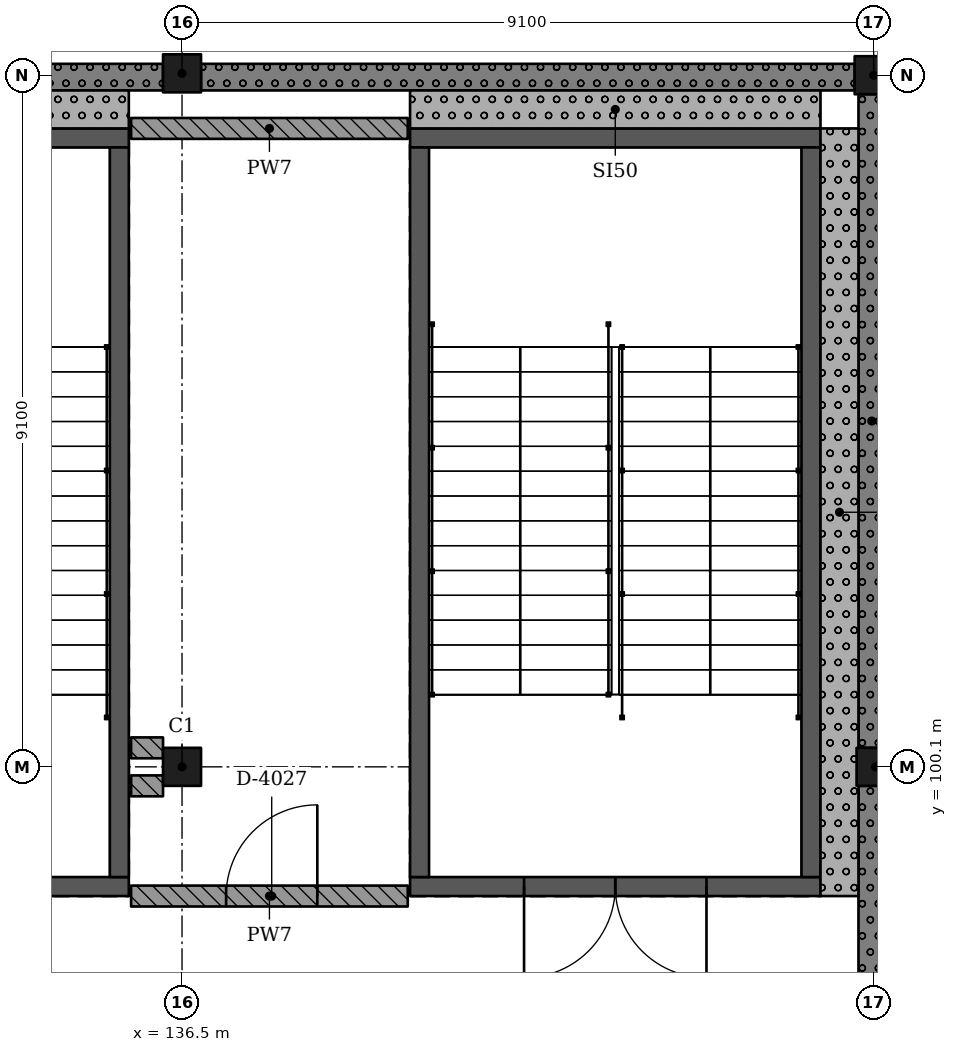
"""IFC4 building model, lengths in metres.
Left out: names, types, materials, properties, quantities, classifications, styles, units other than length and angle.
Written with IfcOpenShell. Run it as: python <this file> out.ifc"""

import sys

from ifc_helpers import new_model, si_unit, direction, frame, frame_2d, origin, origin_2d, place, context, subcontext, project, spatial, rectangle, extrude, element, fill, save


model = new_model("IFC4")
c1 = context("Model", 3, precision=1e-05, world=origin(), true_north=direction((0.0, 1.0)))
c2 = subcontext(c1, "Body", "Model", "MODEL_VIEW")
j1 = project(units=[si_unit("LENGTHUNIT", "METRE"), si_unit("PLANEANGLEUNIT", "RADIAN")], contexts=[c1])
p1 = place(None, origin())
s1 = spatial("IfcSite", under=j1, at=p1, CompositionType="ELEMENT")
p2 = place(p1, origin())
s2 = spatial("IfcBuilding", under=s1, at=p2, CompositionType="ELEMENT")
p3 = place(p2, frame((0.0, 0.0, 20.02)))
s3 = spatial("IfcBuildingStorey", under=s2, at=p3, CompositionType="ELEMENT", Elevation=20.02)
for number, where, z_axis, x_axis in (
    (1, (136.5, 100.1, 0.0), (0.0, 0.0, 1.0), (1.0, 0.0, 0.0)),
    (2, (136.5, 109.225, 0.0), (0.0, 0.0, 1.0), (1.0, 0.0, 0.0)),
    (3, (145.625, 100.1, 0.0), (0.0, 0.0, 1.0), (1.0, 0.0, 0.0)),
    (4, (145.6, 109.2, 0.0), (0.0, 0.0, 1.0), (1.0, 0.0, 0.0)),
):
    element("IfcColumn", number, at=place(p3, frame(where, z_axis=z_axis, x_axis=x_axis)), inside=s3, PredefinedType="COLUMN", context=c2, shape_type="SweptSolid", body=[
        extrude(rectangle(XDim=0.5, YDim=0.5, at=origin_2d()), origin(), (0.0, 0.0, 1.0), 4.55),
    ])
p4 = place(p3, frame((144.9, 98.525, 0.0), z_axis=(0.0, 0.0, 1.0), x_axis=(-1.0, 0.0, 0.0)))
e5 = element("IfcWall", 5, at=p4, inside=s3, PredefinedType="SHEAR", context=c2, shape_type="SweptSolid", body=[
    extrude(rectangle(XDim=5.4, YDim=0.25, at=frame_2d((2.7, 0.0))), origin(), (0.0, 0.0, 1.0), 4.55),
])
p5 = place(p4, frame((1.5, 0.0, 0.0)))
e6 = element("IfcOpeningElement", 6, at=p5, cuts=e5, PredefinedType="OPENING", context=c2, shape_type="SweptSolid", body=[
    extrude(rectangle(XDim=2.4, YDim=2.1, at=frame_2d((1.2, 1.05))), frame((0.0, 0.135, 0.0), z_axis=(0.0, -1.0, 0.0), x_axis=(1.0, 0.0, 0.0)), (0.0, 0.0, 1.0), 0.27),
])
p6 = place(p3, frame((144.9, 108.375, 0.0), z_axis=(0.0, 0.0, 1.0), x_axis=(-1.0, 0.0, 0.0)))
e7 = element("IfcWall", 7, at=p6, inside=s3, PredefinedType="SHEAR", context=c2, shape_type="SweptSolid", body=[
    extrude(rectangle(XDim=5.4, YDim=0.25, at=frame_2d((2.7, 0.0))), origin(), (0.0, 0.0, 1.0), 4.55),
])
for number, where, z_axis, x_axis in (
    (8, (139.625, 108.25, 0.0), (0.0, 0.0, 1.0), (0.0, -1.0, 0.0)),
    (9, (144.775, 108.25, 0.0), (0.0, 0.0, 1.0), (0.0, -1.0, 0.0)),
):
    element("IfcWall", number, at=place(p3, frame(where, z_axis=z_axis, x_axis=x_axis)), inside=s3, PredefinedType="SHEAR", context=c2, shape_type="SweptSolid", body=[
        extrude(rectangle(XDim=9.6, YDim=0.25, at=frame_2d((4.8, 0.0))), origin(), (0.0, 0.0, 1.0), 4.55),
    ])
p7 = place(p3, frame((135.8, 98.525, 0.0), z_axis=(0.0, 0.0, 1.0), x_axis=(-1.0, 0.0, 0.0)))
e10 = element("IfcWall", 10, at=p7, inside=s3, PredefinedType="SHEAR", context=c2, shape_type="SweptSolid", body=[
    extrude(rectangle(XDim=5.4, YDim=0.25, at=frame_2d((2.7, 0.0))), origin(), (0.0, 0.0, 1.0), 4.55),
])
p8 = place(p7, frame((1.5, 0.0, 0.0)))
e11 = element("IfcOpeningElement", 11, at=p8, cuts=e10, PredefinedType="OPENING", context=c2, shape_type="SweptSolid", body=[
    extrude(rectangle(XDim=2.4, YDim=2.1, at=frame_2d((1.2, 1.05))), frame((0.0, 0.135, 0.0), z_axis=(0.0, -1.0, 0.0), x_axis=(1.0, 0.0, 0.0)), (0.0, 0.0, 1.0), 0.27),
])
p9 = place(p3, frame((135.8, 108.375, 0.0), z_axis=(0.0, 0.0, 1.0), x_axis=(-1.0, 0.0, 0.0)))
e12 = element("IfcWall", 12, at=p9, inside=s3, PredefinedType="SHEAR", context=c2, shape_type="SweptSolid", body=[
    extrude(rectangle(XDim=5.4, YDim=0.25, at=frame_2d((2.7, 0.0))), origin(), (0.0, 0.0, 1.0), 4.55),
])
p10 = place(p3, frame((135.675, 108.25, 0.0), z_axis=(0.0, 0.0, 1.0), x_axis=(0.0, -1.0, 0.0)))
e13 = element("IfcWall", 13, at=p10, inside=s3, PredefinedType="SHEAR", context=c2, shape_type="SweptSolid", body=[
    extrude(rectangle(XDim=9.6, YDim=0.25, at=frame_2d((4.8, 0.0))), origin(), (0.0, 0.0, 1.0), 4.55),
])
p11 = place(p3, frame((145.575, 91.25, 0.0), z_axis=(0.0, 0.0, 1.0), x_axis=(0.0, 1.0, 0.0)))
e14 = element("IfcWall", 14, at=p11, inside=s3, PredefinedType="SOLIDWALL", context=c2, shape_type="SweptSolid", body=[
    extrude(rectangle(XDim=8.6, YDim=0.35, at=frame_2d((4.3, 0.0))), origin(), (0.0, 0.0, 1.0), 3.5),
])
p12 = place(p3, frame((145.575, 100.35, 0.0), z_axis=(0.0, 0.0, 1.0), x_axis=(0.0, 1.0, 0.0)))
e15 = element("IfcWall", 15, at=p12, inside=s3, PredefinedType="SOLIDWALL", context=c2, shape_type="SweptSolid", body=[
    extrude(rectangle(XDim=8.6, YDim=0.35, at=frame_2d((4.3, 0.0))), origin(), (0.0, 0.0, 1.0), 3.5),
])
for number, where, z_axis, x_axis in (
    (16, (145.35, 109.175, 0.0), (0.0, 0.0, 1.0), (-1.0, 0.0, 0.0)),
    (17, (136.25, 109.175, 0.0), (0.0, 0.0, 1.0), (-1.0, 0.0, 0.0)),
):
    element("IfcWall", number, at=place(p3, frame(where, z_axis=z_axis, x_axis=x_axis)), inside=s3, PredefinedType="SOLIDWALL", context=c2, shape_type="SweptSolid", body=[
        extrude(rectangle(XDim=8.6, YDim=0.35, at=frame_2d((4.3, 0.0))), origin(), (0.0, 0.0, 1.0), 3.5),
    ])
p13 = place(p3, frame((139.5, 108.75, 0.0), z_axis=(0.0, 0.0, 1.0), x_axis=(1.0, 0.0, 0.0)))
e18 = element("IfcWall", 18, at=p13, inside=s3, PredefinedType="SOLIDWALL", context=c2, shape_type="SweptSolid", body=[
    extrude(rectangle(XDim=5.4, YDim=0.5, at=frame_2d((2.7, 0.0))), origin(), (0.0, 0.0, 1.0), 4.25),
])
p14 = place(p3, frame((145.15, 98.4, 0.0), z_axis=(0.0, 0.0, 1.0), x_axis=(0.0, 1.0, 0.0)))
e19 = element("IfcWall", 19, at=p14, inside=s3, PredefinedType="SOLIDWALL", context=c2, shape_type="SweptSolid", body=[
    extrude(rectangle(XDim=10.1, YDim=0.5, at=frame_2d((5.05, 0.0))), origin(), (0.0, 0.0, 1.0), 4.55),
])
p15 = place(p3, frame((130.4, 108.75, 0.0), z_axis=(0.0, 0.0, 1.0), x_axis=(1.0, 0.0, 0.0)))
e20 = element("IfcWall", 20, at=p15, inside=s3, PredefinedType="SOLIDWALL", context=c2, shape_type="SweptSolid", body=[
    extrude(rectangle(XDim=5.4, YDim=0.5, at=frame_2d((2.7, 0.0))), origin(), (0.0, 0.0, 1.0), 4.25),
])
p16 = place(p3, frame((135.83, 98.4, 0.0), z_axis=(0.0, 0.0, 1.0), x_axis=(1.0, 0.0, 0.0)))
e21 = element("IfcWall", 21, at=p16, inside=s3, PredefinedType="SOLIDWALL", context=c2, shape_type="SweptSolid", body=[
    extrude(rectangle(XDim=3.64, YDim=0.275, at=frame_2d((1.82, 0.0))), origin(), (0.0, 0.0, 1.0), 4.25),
])
p17 = place(p16, frame((1.25, 0.0, 0.0)))
e22 = element("IfcOpeningElement", 22, at=p17, cuts=e21, PredefinedType="OPENING", context=c2, shape_type="SweptSolid", body=[
    extrude(rectangle(XDim=1.2, YDim=2.4, at=frame_2d((0.6, 1.2))), frame((0.0, 0.147, 0.0), z_axis=(0.0, -1.0, 0.0), x_axis=(1.0, 0.0, 0.0)), (0.0, 0.0, 1.0), 0.295),
])
p18 = place(p3, frame((135.83, 99.85, 0.0), z_axis=(0.0, 0.0, 1.0), x_axis=(1.0, 0.0, 0.0)))
e23 = element("IfcWall", 23, at=p18, inside=s3, PredefinedType="SOLIDWALL", context=c2, shape_type="SweptSolid", body=[
    extrude(rectangle(XDim=0.42, YDim=0.275, at=frame_2d((0.21, 0.0))), origin(), (0.0, 0.0, 1.0), 4.25),
])
p19 = place(p3, frame((135.83, 108.5, 0.0), z_axis=(0.0, 0.0, 1.0), x_axis=(1.0, 0.0, 0.0)))
e24 = element("IfcWall", 24, at=p19, inside=s3, PredefinedType="SOLIDWALL", context=c2, shape_type="SweptSolid", body=[
    extrude(rectangle(XDim=3.64, YDim=0.275, at=frame_2d((1.82, 0.0))), origin(), (0.0, 0.0, 1.0), 4.25),
])
p20 = place(p3, frame((136.25, 100.35, 0.0), z_axis=(0.0, 0.0, 1.0), x_axis=(-1.0, 0.0, 0.0)))
e25 = element("IfcWall", 25, at=p20, inside=s3, PredefinedType="SOLIDWALL", context=c2, shape_type="SweptSolid", body=[
    extrude(rectangle(XDim=0.42, YDim=0.275, at=frame_2d((0.21, 0.0))), origin(), (0.0, 0.0, 1.0), 4.25),
])
p21 = place(p17, origin())
e26 = element("IfcDoor", 26, at=p21, inside=s3, OperationType="SINGLE_SWING_LEFT", PredefinedType="DOOR", context=c2, shape_type="SweptSolid", body=[
    extrude(rectangle(XDim=1.2, YDim=2.4, at=frame_2d((0.6, 1.2))), frame((0.0, 0.025, 0.0), z_axis=(0.0, -1.0, 0.0), x_axis=(1.0, 0.0, 0.0)), (0.0, 0.0, 1.0), 0.05),
])
fill(e22, e26)
p22 = place(p5, origin())
e27 = element("IfcDoor", 27, at=p22, inside=s3, OperationType="DOUBLE_DOOR_SINGLE_SWING", PredefinedType="DOOR", context=c2, shape_type="SweptSolid", body=[
    extrude(rectangle(XDim=2.4, YDim=2.1, at=frame_2d((1.2, 1.05))), frame((0.0, 0.025, 0.0), z_axis=(0.0, -1.0, 0.0), x_axis=(1.0, 0.0, 0.0)), (0.0, 0.0, 1.0), 0.05),
])
fill(e6, e27)
save(model, sys.argv[1])
